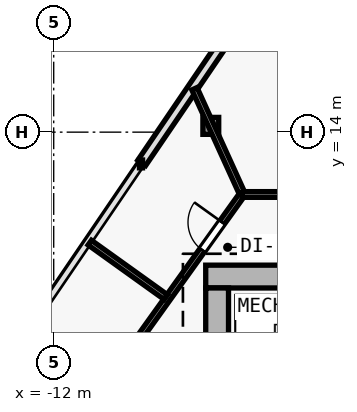
"""IFC4 building model, lengths in metres.
Left out: names, types, materials, properties, quantities, classifications, styles, units other than length and angle.
Written with IfcOpenShell. Run it as: python <this file> out.ifc"""

import sys

from ifc_helpers import new_model, si_unit, direction, frame, frame_2d, origin, origin_2d, place, context, subcontext, project, spatial, rectangle, i_section, extrude, element, fill, save


model = new_model("IFC4")
c1 = context("Model", 3, precision=1e-05, world=origin(), true_north=direction((0.0, 1.0)))
c2 = subcontext(c1, "Body", "Model", "MODEL_VIEW")
j1 = project(units=[si_unit("LENGTHUNIT", "METRE"), si_unit("PLANEANGLEUNIT", "RADIAN")], contexts=[c1])
p1 = place(None, origin())
s1 = spatial("IfcSite", under=j1, at=p1, CompositionType="ELEMENT")
p2 = place(p1, origin())
s2 = spatial("IfcBuilding", under=s1, at=p2, CompositionType="ELEMENT")
p3 = place(p2, frame((0.0, 0.0, 40.8)))
s3 = spatial("IfcBuildingStorey", under=s2, at=p3, CompositionType="ELEMENT", Elevation=40.8)
p4 = place(p3, frame((-7.7, 10.2, 0.0), z_axis=(0.0, 0.0, 1.0), x_axis=(1.0, 0.0, 0.0)))
e1 = element("IfcColumn", 1, at=p4, inside=s3, PredefinedType="COLUMN", context=c2, shape_type="SweptSolid", body=[
    extrude(i_section(OverallWidth=0.416, OverallDepth=0.446, WebThickness=0.025, FlangeThickness=0.04, FilletRadius=0.015, at=origin_2d()), origin(), (0.0, 0.0, 1.0), 3.6),
])
p5 = place(p3, frame((-7.866, 14.165, 0.005), z_axis=(0.00911461711, -0.002584742166, 0.999955120424), x_axis=(0.272824100275, 0.962063932548, 0.0)))
e2 = element("IfcColumn", 2, at=p5, inside=s3, PredefinedType="COLUMN", context=c2, shape_type="SweptSolid", body=[
    extrude(i_section(OverallWidth=0.416, OverallDepth=0.446, WebThickness=0.025, FlangeThickness=0.04, FilletRadius=0.015, at=origin_2d()), origin(), (0.0, 0.0, 1.0), 3.589),
])
p6 = place(p3, frame((-9.684, 13.191, 0.0), z_axis=(0.0, 0.0, 1.0), x_axis=(0.562473549685, 0.826815279192, 0.0)))
e3 = element("IfcWall", 3, at=p6, inside=s3, PredefinedType="SOLIDWALL", context=c2, shape_type="SweptSolid", body=[
    extrude(rectangle(XDim=12.536, YDim=0.25, at=frame_2d((6.268, 0.0))), origin(), (0.0, 0.0, 1.0), 3.35),
])
p7 = place(p6, frame((5.718, 0.0, 0.62)))
e4 = element("IfcOpeningElement", 4, at=p7, cuts=e3, PredefinedType="OPENING", context=c2, shape_type="SweptSolid", body=[
    extrude(rectangle(XDim=1.1, YDim=1.8, at=frame_2d((0.55, 0.9))), frame((0.0, 0.135, 0.0), z_axis=(0.0, -1.0, 0.0), x_axis=(1.0, 0.0, 0.0)), (0.0, 0.0, 1.0), 0.27),
])
p8 = place(p3, frame((8.0, 10.2, 0.0), z_axis=(0.0, 0.0, 1.0), x_axis=(-1.0, 0.0, 0.0)))
e5 = element("IfcWall", 5, at=p8, inside=s3, PredefinedType="SHEAR", context=c2, shape_type="SweptSolid", body=[
    extrude(rectangle(XDim=16.0, YDim=0.6, at=frame_2d((8.0, 0.0))), origin(), (0.0, 0.0, 1.0), 3.35),
])
p9 = place(p8, frame((4.45, 0.0, 0.0)))
e6 = element("IfcOpeningElement", 6, at=p9, cuts=e5, PredefinedType="OPENING", context=c2, shape_type="SweptSolid", body=[
    extrude(rectangle(XDim=1.1, YDim=2.15, at=frame_2d((0.55, 1.075))), frame((0.0, 0.31, 0.0), z_axis=(0.0, -1.0, 0.0), x_axis=(1.0, 0.0, 0.0)), (0.0, 0.0, 1.0), 0.62),
])
p10 = place(p3, frame((-7.7, -9.1, 0.0), z_axis=(0.0, 0.0, 1.0), x_axis=(0.0, 1.0, 0.0)))
e7 = element("IfcWall", 7, at=p10, inside=s3, PredefinedType="SHEAR", context=c2, shape_type="SweptSolid", body=[
    extrude(rectangle(XDim=19.0, YDim=0.6, at=frame_2d((9.5, 0.0))), origin(), (0.0, 0.0, 1.0), 3.35),
])
p11 = place(p10, frame((12.65, 0.0, 0.0)))
e8 = element("IfcOpeningElement", 8, at=p11, cuts=e7, PredefinedType="OPENING", context=c2, shape_type="SweptSolid", body=[
    extrude(rectangle(XDim=1.1, YDim=2.15, at=frame_2d((0.55, 1.075))), frame((0.0, 0.31, 0.0), z_axis=(0.0, -1.0, 0.0), x_axis=(1.0, 0.0, 0.0)), (0.0, 0.0, 1.0), 0.62),
])
p12 = place(p3, frame((-9.86, 8.426, 0.0), z_axis=(0.0, 0.0, 1.0), x_axis=(0.582449511476, 0.812866881218, 0.0)))
e9 = element("IfcWall", 9, at=p12, inside=s3, PredefinedType="PARTITIONING", context=c2, shape_type="SweptSolid", body=[
    extrude(rectangle(XDim=4.84, YDim=0.15, at=frame_2d((2.42, 0.0))), origin(), (0.0, 0.0, 1.0), 2.725),
])
p13 = place(p12, frame((3.038, 0.0, 0.0)))
e10 = element("IfcOpeningElement", 10, at=p13, cuts=e9, PredefinedType="OPENING", context=c2, shape_type="SweptSolid", body=[
    extrude(rectangle(XDim=0.9, YDim=2.1, at=frame_2d((0.45, 1.05))), frame((0.0, 0.085, 0.0), z_axis=(0.0, -1.0, 0.0), x_axis=(1.0, 0.0, 0.0)), (0.0, 0.0, 1.0), 0.17),
])
p14 = place(p3, frame((-7.041, 12.36, 0.0), z_axis=(0.0, 0.0, 1.0), x_axis=(1.0, 0.0, 0.0)))
e11 = element("IfcWall", 11, at=p14, inside=s3, PredefinedType="PARTITIONING", context=c2, shape_type="SweptSolid", body=[
    extrude(rectangle(XDim=14.082, YDim=0.15, at=frame_2d((7.041, 0.0))), origin(), (0.0, 0.0, 1.0), 3.35),
])
p15 = place(p14, frame((6.591, 0.0, 0.0)))
e12 = element("IfcOpeningElement", 12, at=p15, cuts=e11, PredefinedType="OPENING", context=c2, shape_type="SweptSolid", body=[
    extrude(rectangle(XDim=0.9, YDim=2.1, at=frame_2d((0.45, 1.05))), frame((0.0, 0.085, 0.0), z_axis=(0.0, -1.0, 0.0), x_axis=(1.0, 0.0, 0.0)), (0.0, 0.0, 1.0), 0.17),
])
p16 = place(p3, frame((-7.053, 12.409, 0.0), z_axis=(0.0, 0.0, 1.0), x_axis=(-0.414225633465, 0.910174227596, 0.0)))
e13 = element("IfcWall", 13, at=p16, inside=s3, PredefinedType="PARTITIONING", context=c2, shape_type="SweptSolid", body=[
    extrude(rectangle(XDim=3.002, YDim=0.15, at=frame_2d((1.501, 0.0))), origin(), (0.0, 0.0, 1.0), 2.725),
])
p17 = place(p3, frame((-9.05, 9.659, 0.0), z_axis=(0.0, 0.0, 1.0), x_axis=(-0.812854692653, 0.582466521468, 0.0)))
e14 = element("IfcWall", 14, at=p17, inside=s3, PredefinedType="PARTITIONING", context=c2, shape_type="SweptSolid", body=[
    extrude(rectangle(XDim=2.462, YDim=0.15, at=frame_2d((1.231, 0.0))), origin(), (0.0, 0.0, 1.0), 2.735),
])
p18 = place(p13, origin())
e15 = element("IfcDoor", 15, at=p18, inside=s3, OperationType="SINGLE_SWING_RIGHT", PredefinedType="DOOR", context=c2, shape_type="SweptSolid", body=[
    extrude(rectangle(XDim=0.9, YDim=2.1, at=frame_2d((0.45, 1.05))), frame((0.0, 0.025, 0.0), z_axis=(0.0, -1.0, 0.0), x_axis=(1.0, 0.0, 0.0)), (0.0, 0.0, 1.0), 0.05),
])
fill(e10, e15)
save(model, sys.argv[1])
